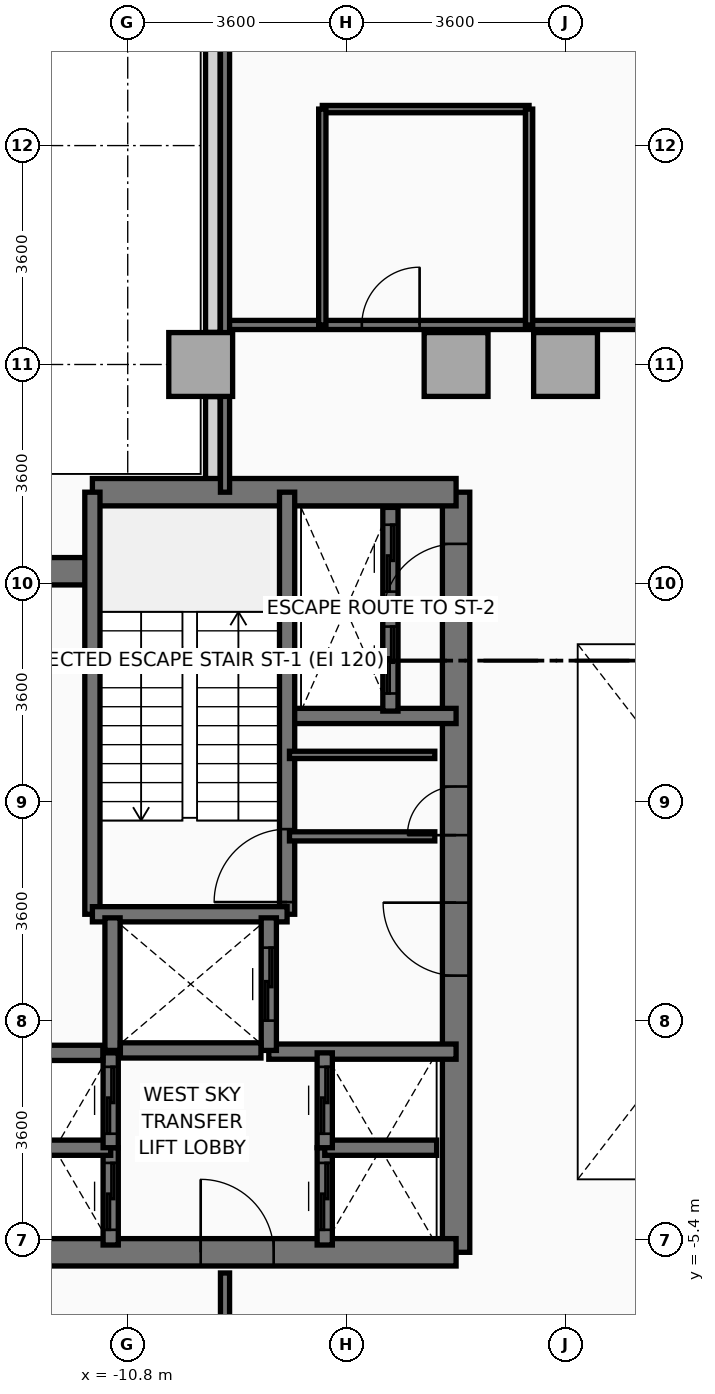
"""IFC4 building model, lengths in metres.
Left out: names, types, materials, properties, quantities, classifications, styles, units other than length and angle.
Written with IfcOpenShell. Run it as: python <this file> out.ifc"""

import sys

from ifc_helpers import new_model, si_unit, direction, frame, frame_2d, origin, origin_2d, place, context, subcontext, project, spatial, rectangle, extrude, source, transform, mapped, element, fill, save


model = new_model("IFC4")
c1 = context("Model", 3, precision=1e-05, world=origin(), true_north=direction((0.0, 1.0)))
c2 = subcontext(c1, "Body", "Model", "MODEL_VIEW")
j1 = project(units=[si_unit("LENGTHUNIT", "METRE"), si_unit("PLANEANGLEUNIT", "RADIAN")], contexts=[c1])
p1 = place(None, origin())
s1 = spatial("IfcSite", under=j1, at=p1, CompositionType="ELEMENT")
p2 = place(p1, origin())
s2 = spatial("IfcBuilding", under=s1, at=p2, CompositionType="ELEMENT")
p3 = place(p2, frame((0.0, 0.0, 93.0)))
s3 = spatial("IfcBuildingStorey", under=s2, at=p3, CompositionType="ELEMENT", Elevation=93.0)
m1 = source(origin(), c2, "Body", "SweptSolid", [
    extrude(rectangle(XDim=1.05, YDim=1.05, at=origin_2d()), origin(), (0.0, 0.0, 1.0), 4.0),
])
for number, where, z_axis, x_axis in (
    (1, (-9.6, 9.0, 0.0), (0.0, 0.0, 1.0), (1.0, 0.0, 0.0)),
    (2, (-5.4, 9.0, 0.0), (0.0, 0.0, 1.0), (1.0, 0.0, 0.0)),
    (3, (-3.6, 9.0, 0.0), (0.0, 0.0, 1.0), (1.0, 0.0, 0.0)),
):
    element("IfcColumn", number, at=place(p3, frame(where, z_axis=z_axis, x_axis=x_axis)), inside=s3, PredefinedType="COLUMN", context=c2, shape_type="MappedRepresentation", body=[
        mapped(m1, transform((0.0, 0.0, 0.0), x_axis=(1.0, 0.0, 0.0), y_axis=(0.0, 1.0, 0.0), z_axis=(0.0, 0.0, 1.0), scale=1.0)),
    ])
p4 = place(p3, frame((-9.4, 6.953, 0.0), z_axis=(0.0, 0.0, 1.0), x_axis=(0.0, 1.0, 0.0)))
e4 = element("IfcWall", 4, at=p4, inside=s3, PredefinedType="PARAPET", context=c2, shape_type="SweptSolid", body=[
    extrude(rectangle(XDim=1.519, YDim=0.24, at=frame_2d((0.76, 0.0))), origin(), (0.0, 0.0, 1.0), 1.15),
])
p5 = place(p3, frame((-9.4, 9.528, 0.0), z_axis=(0.0, 0.0, 1.0), x_axis=(0.0, 1.0, 0.0)))
e5 = element("IfcWall", 5, at=p5, inside=s3, PredefinedType="PARAPET", context=c2, shape_type="SweptSolid", body=[
    extrude(rectangle(XDim=6.075, YDim=0.24, at=frame_2d((3.037, 0.0))), origin(), (0.0, 0.0, 1.0), 1.15),
])
p6 = place(p3, frame((-5.4, -5.6, 0.0), z_axis=(0.0, 0.0, 1.0), x_axis=(0.0, 1.0, 0.0)))
e6 = element("IfcWall", 6, at=p6, inside=s3, PredefinedType="SHEAR", context=c2, shape_type="SweptSolid", body=[
    extrude(rectangle(XDim=12.5, YDim=0.45, at=frame_2d((6.25, 0.0))), origin(), (0.0, 0.0, 1.0), 4.0),
])
p7 = place(p6, frame((4.55, 0.0, 0.0)))
e7 = element("IfcOpeningElement", 7, at=p7, cuts=e6, PredefinedType="OPENING", context=c2, shape_type="SweptSolid", body=[
    extrude(rectangle(XDim=1.2, YDim=2.2, at=frame_2d((0.6, 1.1))), frame((0.0, 0.235, 0.0), z_axis=(0.0, -1.0, 0.0), x_axis=(1.0, 0.0, 0.0)), (0.0, 0.0, 1.0), 0.47),
])
p8 = place(p6, frame((10.45, 0.0, 0.0)))
e8 = element("IfcOpeningElement", 8, at=p8, cuts=e6, PredefinedType="OPENING", context=c2, shape_type="SweptSolid", body=[
    extrude(rectangle(XDim=1.2, YDim=2.2, at=frame_2d((0.6, 1.1))), frame((0.0, 0.235, 0.0), z_axis=(0.0, -1.0, 0.0), x_axis=(1.0, 0.0, 0.0)), (0.0, 0.0, 1.0), 0.47),
])
p9 = place(p6, frame((6.86, 0.0, 0.0)))
e9 = element("IfcOpeningElement", 9, at=p9, cuts=e6, PredefinedType="OPENING", context=c2, shape_type="SweptSolid", body=[
    extrude(rectangle(XDim=0.8, YDim=2.1, at=frame_2d((0.4, 1.05))), frame((0.0, 0.235, 0.0), z_axis=(0.0, -1.0, 0.0), x_axis=(1.0, 0.0, 0.0)), (0.0, 0.0, 1.0), 0.47),
])
p10 = place(p3, frame((-11.381, 6.9, 0.0), z_axis=(0.0, 0.0, 1.0), x_axis=(1.0, 0.0, 0.0)))
e10 = element("IfcWall", 10, at=p10, inside=s3, PredefinedType="SHEAR", context=c2, shape_type="SweptSolid", body=[
    extrude(rectangle(XDim=5.981, YDim=0.45, at=frame_2d((2.991, 0.0))), origin(), (0.0, 0.0, 1.0), 4.0),
])
p11 = place(p3, frame((-13.2, 5.6, 0.0), z_axis=(0.0, 0.0, 1.0), x_axis=(1.0, 0.0, 0.0)))
e11 = element("IfcWall", 11, at=p11, inside=s3, PredefinedType="SHEAR", context=c2, shape_type="SweptSolid", body=[
    extrude(rectangle(XDim=1.819, YDim=0.45, at=frame_2d((0.909, 0.0))), origin(), (0.0, 0.0, 1.0), 4.0),
])
p12 = place(p3, frame((-13.2, -5.6, 0.0), z_axis=(0.0, 0.0, 1.0), x_axis=(1.0, 0.0, 0.0)))
e12 = element("IfcWall", 12, at=p12, inside=s3, PredefinedType="SHEAR", context=c2, shape_type="SweptSolid", body=[
    extrude(rectangle(XDim=7.8, YDim=0.45, at=frame_2d((3.9, 0.0))), origin(), (0.0, 0.0, 1.0), 4.0),
])
p13 = place(p12, frame((3.6, 0.0, 0.0)))
e13 = element("IfcOpeningElement", 13, at=p13, cuts=e12, PredefinedType="OPENING", context=c2, shape_type="SweptSolid", body=[
    extrude(rectangle(XDim=1.2, YDim=2.2, at=frame_2d((0.6, 1.1))), frame((0.0, 0.235, 0.0), z_axis=(0.0, -1.0, 0.0), x_axis=(1.0, 0.0, 0.0)), (0.0, 0.0, 1.0), 0.47),
])
p14 = place(p3, frame((-8.18, 3.22, 0.0), z_axis=(0.0, 0.0, 1.0), x_axis=(1.0, 0.0, 0.0)))
e14 = element("IfcWall", 14, at=p14, inside=s3, PredefinedType="SOLIDWALL", context=c2, shape_type="SweptSolid", body=[
    extrude(rectangle(XDim=2.78, YDim=0.25, at=frame_2d((1.39, 0.0))), origin(), (0.0, 0.0, 1.0), 4.0),
])
p15 = place(p3, frame((-8.48, -2.3, 0.0), z_axis=(0.0, 0.0, 1.0), x_axis=(1.0, 0.0, 0.0)))
e15 = element("IfcWall", 15, at=p15, inside=s3, PredefinedType="SOLIDWALL", context=c2, shape_type="SweptSolid", body=[
    extrude(rectangle(XDim=3.08, YDim=0.25, at=frame_2d((1.54, 0.0))), origin(), (0.0, 0.0, 1.0), 4.0),
])
p16 = place(p3, frame((-8.179, -0.041, 0.0), z_axis=(0.0, 0.0, 1.0), x_axis=(0.0, 1.0, 0.0)))
e16 = element("IfcWall", 16, at=p16, inside=s3, PredefinedType="SOLIDWALL", context=c2, shape_type="SweptSolid", body=[
    extrude(rectangle(XDim=6.941, YDim=0.25, at=frame_2d((3.47, 0.0))), origin(), (0.0, 0.0, 1.0), 4.0),
])
p17 = place(p16, frame((0.2, 0.0, 0.0)))
e17 = element("IfcOpeningElement", 17, at=p17, cuts=e16, PredefinedType="OPENING", context=c2, shape_type="SweptSolid", body=[
    extrude(rectangle(XDim=1.2, YDim=2.2, at=frame_2d((0.6, 1.1))), frame((0.0, 0.135, 0.0), z_axis=(0.0, -1.0, 0.0), x_axis=(1.0, 0.0, 0.0)), (0.0, 0.0, 1.0), 0.27),
])
p18 = place(p3, frame((-11.381, -0.041, 0.0), z_axis=(0.0, 0.0, 1.0), x_axis=(0.0, 1.0, 0.0)))
e18 = element("IfcWall", 18, at=p18, inside=s3, PredefinedType="SOLIDWALL", context=c2, shape_type="SweptSolid", body=[
    extrude(rectangle(XDim=6.941, YDim=0.25, at=frame_2d((3.47, 0.0))), origin(), (0.0, 0.0, 1.0), 4.0),
])
p19 = place(p3, frame((-11.381, -0.041, 0.0), z_axis=(0.0, 0.0, 1.0), x_axis=(1.0, 0.0, 0.0)))
e19 = element("IfcWall", 19, at=p19, inside=s3, PredefinedType="SOLIDWALL", context=c2, shape_type="SweptSolid", body=[
    extrude(rectangle(XDim=3.202, YDim=0.25, at=frame_2d((1.601, 0.0))), origin(), (0.0, 0.0, 1.0), 4.0),
])
p20 = place(p3, frame((-11.05, -2.28, 0.0), z_axis=(0.0, 0.0, 1.0), x_axis=(0.0, 1.0, 0.0)))
e20 = element("IfcWall", 20, at=p20, inside=s3, PredefinedType="SOLIDWALL", context=c2, shape_type="SweptSolid", body=[
    extrude(rectangle(XDim=2.18, YDim=0.25, at=frame_2d((1.09, 0.0))), origin(), (0.0, 0.0, 1.0), 4.0),
])
p21 = place(p3, frame((-8.48, -2.28, 0.0), z_axis=(0.0, 0.0, 1.0), x_axis=(0.0, 1.0, 0.0)))
e21 = element("IfcWall", 21, at=p21, inside=s3, PredefinedType="SOLIDWALL", context=c2, shape_type="SweptSolid", body=[
    extrude(rectangle(XDim=2.18, YDim=0.25, at=frame_2d((1.09, 0.0))), origin(), (0.0, 0.0, 1.0), 4.0),
])
p22 = place(p21, frame((0.49, 0.0, 0.0)))
e22 = element("IfcOpeningElement", 22, at=p22, cuts=e21, PredefinedType="OPENING", context=c2, shape_type="SweptSolid", body=[
    extrude(rectangle(XDim=1.2, YDim=2.2, at=frame_2d((0.6, 1.1))), frame((0.0, 0.135, 0.0), z_axis=(0.0, -1.0, 0.0), x_axis=(1.0, 0.0, 0.0)), (0.0, 0.0, 1.0), 0.27),
])
p23 = place(p3, frame((-10.921, -2.28, 0.0), z_axis=(0.0, 0.0, 1.0), x_axis=(1.0, 0.0, 0.0)))
e23 = element("IfcWall", 23, at=p23, inside=s3, PredefinedType="SOLIDWALL", context=c2, shape_type="SweptSolid", body=[
    extrude(rectangle(XDim=2.312, YDim=0.25, at=frame_2d((1.156, 0.0))), origin(), (0.0, 0.0, 1.0), 4.0),
])
p24 = place(p3, frame((-11.08, -5.48, 0.0), z_axis=(0.0, 0.0, 1.0), x_axis=(0.0, 1.0, 0.0)))
e24 = element("IfcWall", 24, at=p24, inside=s3, PredefinedType="SOLIDWALL", context=c2, shape_type="SweptSolid", body=[
    extrude(rectangle(XDim=1.6, YDim=0.25, at=frame_2d((0.8, 0.0))), origin(), (0.0, 0.0, 1.0), 4.0),
])
p25 = place(p24, frame((0.25, 0.0, 0.0)))
e25 = element("IfcOpeningElement", 25, at=p25, cuts=e24, PredefinedType="OPENING", context=c2, shape_type="SweptSolid", body=[
    extrude(rectangle(XDim=1.1, YDim=2.2, at=frame_2d((0.55, 1.1))), frame((0.0, 0.135, 0.0), z_axis=(0.0, -1.0, 0.0), x_axis=(1.0, 0.0, 0.0)), (0.0, 0.0, 1.0), 0.27),
])
p26 = place(p3, frame((-12.92, -3.88, 0.0), z_axis=(0.0, 0.0, 1.0), x_axis=(1.0, 0.0, 0.0)))
e26 = element("IfcWall", 26, at=p26, inside=s3, PredefinedType="SOLIDWALL", context=c2, shape_type="SweptSolid", body=[
    extrude(rectangle(XDim=1.84, YDim=0.25, at=frame_2d((0.92, 0.0))), origin(), (0.0, 0.0, 1.0), 4.0),
])
p27 = place(p3, frame((-11.08, -3.88, 0.0), z_axis=(0.0, 0.0, 1.0), x_axis=(0.0, 1.0, 0.0)))
e27 = element("IfcWall", 27, at=p27, inside=s3, PredefinedType="SOLIDWALL", context=c2, shape_type="SweptSolid", body=[
    extrude(rectangle(XDim=1.56, YDim=0.25, at=frame_2d((0.78, 0.0))), origin(), (0.0, 0.0, 1.0), 4.0),
])
p28 = place(p27, frame((0.23, 0.0, 0.0)))
e28 = element("IfcOpeningElement", 28, at=p28, cuts=e27, PredefinedType="OPENING", context=c2, shape_type="SweptSolid", body=[
    extrude(rectangle(XDim=1.1, YDim=2.2, at=frame_2d((0.55, 1.1))), frame((0.0, 0.135, 0.0), z_axis=(0.0, -1.0, 0.0), x_axis=(1.0, 0.0, 0.0)), (0.0, 0.0, 1.0), 0.27),
])
p29 = place(p3, frame((-12.791, -2.32, 0.0), z_axis=(0.0, 0.0, 1.0), x_axis=(1.0, 0.0, 0.0)))
e29 = element("IfcWall", 29, at=p29, inside=s3, PredefinedType="SOLIDWALL", context=c2, shape_type="SweptSolid", body=[
    extrude(rectangle(XDim=1.582, YDim=0.25, at=frame_2d((0.791, 0.0))), origin(), (0.0, 0.0, 1.0), 4.0),
])
p30 = place(p3, frame((-7.56, -5.48, 0.0), z_axis=(0.0, 0.0, 1.0), x_axis=(0.0, 1.0, 0.0)))
e30 = element("IfcWall", 30, at=p30, inside=s3, PredefinedType="SOLIDWALL", context=c2, shape_type="SweptSolid", body=[
    extrude(rectangle(XDim=1.6, YDim=0.25, at=frame_2d((0.8, 0.0))), origin(), (0.0, 0.0, 1.0), 4.0),
])
p31 = place(p30, frame((0.25, 0.0, 0.0)))
e31 = element("IfcOpeningElement", 31, at=p31, cuts=e30, PredefinedType="OPENING", context=c2, shape_type="SweptSolid", body=[
    extrude(rectangle(XDim=1.1, YDim=2.2, at=frame_2d((0.55, 1.1))), frame((0.0, 0.135, 0.0), z_axis=(0.0, -1.0, 0.0), x_axis=(1.0, 0.0, 0.0)), (0.0, 0.0, 1.0), 0.27),
])
p32 = place(p3, frame((-7.56, -3.88, 0.0), z_axis=(0.0, 0.0, 1.0), x_axis=(1.0, 0.0, 0.0)))
e32 = element("IfcWall", 32, at=p32, inside=s3, PredefinedType="SOLIDWALL", context=c2, shape_type="SweptSolid", body=[
    extrude(rectangle(XDim=1.84, YDim=0.25, at=frame_2d((0.92, 0.0))), origin(), (0.0, 0.0, 1.0), 4.0),
])
p33 = place(p3, frame((-7.56, -3.88, 0.0), z_axis=(0.0, 0.0, 1.0), x_axis=(0.0, 1.0, 0.0)))
e33 = element("IfcWall", 33, at=p33, inside=s3, PredefinedType="SOLIDWALL", context=c2, shape_type="SweptSolid", body=[
    extrude(rectangle(XDim=1.56, YDim=0.25, at=frame_2d((0.78, 0.0))), origin(), (0.0, 0.0, 1.0), 4.0),
])
p34 = place(p33, frame((0.23, 0.0, 0.0)))
e34 = element("IfcOpeningElement", 34, at=p34, cuts=e33, PredefinedType="OPENING", context=c2, shape_type="SweptSolid", body=[
    extrude(rectangle(XDim=1.1, YDim=2.2, at=frame_2d((0.55, 1.1))), frame((0.0, 0.135, 0.0), z_axis=(0.0, -1.0, 0.0), x_axis=(1.0, 0.0, 0.0)), (0.0, 0.0, 1.0), 0.27),
])
p35 = place(p3, frame((-6.48, 3.3, 0.0), z_axis=(0.0, 0.0, 1.0), x_axis=(0.0, 1.0, 0.0)))
e35 = element("IfcWall", 35, at=p35, inside=s3, PredefinedType="SOLIDWALL", context=c2, shape_type="SweptSolid", body=[
    extrude(rectangle(XDim=1.68, YDim=0.25, at=frame_2d((0.84, 0.0))), origin(), (0.0, 0.0, 1.0), 4.0),
])
p36 = place(p35, frame((0.29, 0.0, 0.0)))
e36 = element("IfcOpeningElement", 36, at=p36, cuts=e35, PredefinedType="OPENING", context=c2, shape_type="SweptSolid", body=[
    extrude(rectangle(XDim=1.1, YDim=2.2, at=frame_2d((0.55, 1.1))), frame((0.0, 0.135, 0.0), z_axis=(0.0, -1.0, 0.0), x_axis=(1.0, 0.0, 0.0)), (0.0, 0.0, 1.0), 0.27),
])
p37 = place(p3, frame((-7.95, 4.98, 0.0), z_axis=(0.0, 0.0, 1.0), x_axis=(1.0, 0.0, 0.0)))
e37 = element("IfcWall", 37, at=p37, inside=s3, PredefinedType="SOLIDWALL", context=c2, shape_type="SweptSolid", body=[
    extrude(rectangle(XDim=1.47, YDim=0.25, at=frame_2d((0.735, 0.0))), origin(), (0.0, 0.0, 1.0), 4.0),
])
p38 = place(p3, frame((-6.48, 4.98, 0.0), z_axis=(0.0, 0.0, 1.0), x_axis=(0.0, 1.0, 0.0)))
e38 = element("IfcWall", 38, at=p38, inside=s3, PredefinedType="SOLIDWALL", context=c2, shape_type="SweptSolid", body=[
    extrude(rectangle(XDim=1.67, YDim=0.25, at=frame_2d((0.835, 0.0))), origin(), (0.0, 0.0, 1.0), 4.0),
])
p39 = place(p38, frame((0.285, 0.0, 0.0)))
e39 = element("IfcOpeningElement", 39, at=p39, cuts=e38, PredefinedType="OPENING", context=c2, shape_type="SweptSolid", body=[
    extrude(rectangle(XDim=1.1, YDim=2.2, at=frame_2d((0.55, 1.1))), frame((0.0, 0.135, 0.0), z_axis=(0.0, -1.0, 0.0), x_axis=(1.0, 0.0, 0.0)), (0.0, 0.0, 1.0), 0.27),
])
p40 = place(p3, frame((-8.14, 1.24, 0.0), z_axis=(0.0, 0.0, 1.0), x_axis=(1.0, 0.0, 0.0)))
e40 = element("IfcWall", 40, at=p40, inside=s3, PredefinedType="PARTITIONING", context=c2, shape_type="SweptSolid", body=[
    extrude(rectangle(XDim=2.39, YDim=0.15, at=frame_2d((1.195, 0.0))), origin(), (0.0, 0.0, 1.0), 3.1),
])
p41 = place(p3, frame((-8.14, 2.58, 0.0), z_axis=(0.0, 0.0, 1.0), x_axis=(1.0, 0.0, 0.0)))
e41 = element("IfcWall", 41, at=p41, inside=s3, PredefinedType="PARTITIONING", context=c2, shape_type="SweptSolid", body=[
    extrude(rectangle(XDim=2.39, YDim=0.12, at=frame_2d((1.195, 0.0))), origin(), (0.0, 0.0, 1.0), 3.1),
])
p42 = place(p3, frame((-9.2, 9.65, 0.0), z_axis=(0.0, 0.0, 1.0), x_axis=(1.0, 0.0, 0.0)))
e42 = element("IfcWall", 42, at=p42, inside=s3, PredefinedType="PARTITIONING", context=c2, shape_type="SweptSolid", body=[
    extrude(rectangle(XDim=18.4, YDim=0.15, at=frame_2d((9.2, 0.0))), origin(), (0.0, 0.0, 1.0), 4.0),
])
p43 = place(p42, frame((2.25, 0.0, 0.0)))
e43 = element("IfcOpeningElement", 43, at=p43, cuts=e42, PredefinedType="OPENING", context=c2, shape_type="SweptSolid", body=[
    extrude(rectangle(XDim=0.95, YDim=2.15, at=frame_2d((0.475, 1.075))), frame((0.0, 0.085, 0.0), z_axis=(0.0, -1.0, 0.0), x_axis=(1.0, 0.0, 0.0)), (0.0, 0.0, 1.0), 0.17),
])
p44 = place(p42, frame((15.55, 0.0, 0.0)))
e44 = element("IfcOpeningElement", 44, at=p44, cuts=e42, PredefinedType="OPENING", context=c2, shape_type="SweptSolid", body=[
    extrude(rectangle(XDim=1.1, YDim=2.2, at=frame_2d((0.55, 1.1))), frame((0.0, 0.085, 0.0), z_axis=(0.0, -1.0, 0.0), x_axis=(1.0, 0.0, 0.0)), (0.0, 0.0, 1.0), 0.17),
])
p45 = place(p3, frame((-9.2, 6.9, 0.0), z_axis=(0.0, 0.0, 1.0), x_axis=(0.0, 1.0, 0.0)))
e45 = element("IfcWall", 45, at=p45, inside=s3, PredefinedType="PARTITIONING", context=c2, shape_type="SweptSolid", body=[
    extrude(rectangle(XDim=8.78, YDim=0.15, at=frame_2d((4.39, 0.0))), origin(), (0.0, 0.0, 1.0), 3.5),
])
p46 = place(p3, frame((-7.6, 13.2, 0.0), z_axis=(0.0, 0.0, 1.0), x_axis=(1.0, 0.0, 0.0)))
e46 = element("IfcWall", 46, at=p46, inside=s3, PredefinedType="PARTITIONING", context=c2, shape_type="SweptSolid", body=[
    extrude(rectangle(XDim=3.4, YDim=0.12, at=frame_2d((1.7, 0.0))), origin(), (0.0, 0.0, 1.0), 4.0),
])
for number, where, z_axis, x_axis in (
    (47, (-7.6, 9.65, 0.0), (0.0, 0.0, 1.0), (0.0, 1.0, 0.0)),
    (48, (-4.2, 9.65, 0.0), (0.0, 0.0, 1.0), (0.0, 1.0, 0.0)),
):
    element("IfcWall", number, at=place(p3, frame(where, z_axis=z_axis, x_axis=x_axis)), inside=s3, PredefinedType="PARTITIONING", context=c2, shape_type="SweptSolid", body=[
        extrude(rectangle(XDim=3.55, YDim=0.12, at=frame_2d((1.775, 0.0))), origin(), (0.0, 0.0, 1.0), 4.0),
    ])
p47 = place(p3, frame((-9.2, -15.68, 0.0), z_axis=(0.0, 0.0, 1.0), x_axis=(0.0, 1.0, 0.0)))
e49 = element("IfcWall", 49, at=p47, inside=s3, PredefinedType="PARTITIONING", context=c2, shape_type="SweptSolid", body=[
    extrude(rectangle(XDim=9.74, YDim=0.15, at=frame_2d((4.87, 0.0))), origin(), (0.0, 0.0, 1.0), 3.5),
])
m2 = source(origin(), c2, "Body", "SweptSolid", [
    extrude(rectangle(XDim=1.2, YDim=2.2, at=frame_2d((0.6, 1.1))), frame((0.0, 0.025, 0.0), z_axis=(0.0, -1.0, 0.0), x_axis=(1.0, 0.0, 0.0)), (0.0, 0.0, 1.0), 0.05),
])
p48 = place(p17, origin())
e50 = element("IfcDoor", 50, at=p48, inside=s3, OperationType="SINGLE_SWING_LEFT", PredefinedType="DOOR", context=c2, shape_type="MappedRepresentation", body=[
    mapped(m2, transform((0.0, 0.0, 0.0), x_axis=(1.0, 0.0, 0.0), y_axis=(0.0, 1.0, 0.0), z_axis=(0.0, 0.0, 1.0), scale=1.0)),
])
fill(e17, e50)
p49 = place(p7, origin())
e51 = element("IfcDoor", 51, at=p49, inside=s3, OperationType="SINGLE_SWING_RIGHT", PredefinedType="DOOR", context=c2, shape_type="MappedRepresentation", body=[
    mapped(m2, transform((0.0, 0.0, 0.0), x_axis=(1.0, 0.0, 0.0), y_axis=(0.0, 1.0, 0.0), z_axis=(0.0, 0.0, 1.0), scale=1.0)),
])
fill(e7, e51)
p50 = place(p8, origin())
e52 = element("IfcDoor", 52, at=p50, inside=s3, OperationType="SINGLE_SWING_LEFT", PredefinedType="DOOR", context=c2, shape_type="MappedRepresentation", body=[
    mapped(m2, transform((0.0, 0.0, 0.0), x_axis=(1.0, 0.0, 0.0), y_axis=(0.0, 1.0, 0.0), z_axis=(0.0, 0.0, 1.0), scale=1.0)),
])
fill(e8, e52)
p51 = place(p13, origin())
e53 = element("IfcDoor", 53, at=p51, inside=s3, OperationType="SINGLE_SWING_LEFT", PredefinedType="DOOR", context=c2, shape_type="MappedRepresentation", body=[
    mapped(m2, transform((0.0, 0.0, 0.0), x_axis=(1.0, 0.0, 0.0), y_axis=(0.0, 1.0, 0.0), z_axis=(0.0, 0.0, 1.0), scale=1.0)),
])
fill(e13, e53)
m3 = source(origin(), c2, "Body", "SweptSolid", [
    extrude(rectangle(XDim=0.8, YDim=2.1, at=frame_2d((0.4, 1.05))), frame((0.0, 0.025, 0.0), z_axis=(0.0, -1.0, 0.0), x_axis=(1.0, 0.0, 0.0)), (0.0, 0.0, 1.0), 0.05),
])
p52 = place(p9, origin())
e54 = element("IfcDoor", 54, at=p52, inside=s3, OperationType="SINGLE_SWING_LEFT", PredefinedType="DOOR", context=c2, shape_type="MappedRepresentation", body=[
    mapped(m3, transform((0.0, 0.0, 0.0), x_axis=(1.0, 0.0, 0.0), y_axis=(0.0, 1.0, 0.0), z_axis=(0.0, 0.0, 1.0), scale=1.0)),
])
fill(e9, e54)
p53 = place(p22, origin())
e55 = element("IfcDoor", 55, at=p53, inside=s3, OperationType="SLIDING_TO_RIGHT", PredefinedType="DOOR", context=c2, shape_type="MappedRepresentation", body=[
    mapped(m2, transform((0.0, 0.0, 0.0), x_axis=(1.0, 0.0, 0.0), y_axis=(0.0, 1.0, 0.0), z_axis=(0.0, 0.0, 1.0), scale=1.0)),
])
fill(e22, e55)
m4 = source(origin(), c2, "Body", "SweptSolid", [
    extrude(rectangle(XDim=1.1, YDim=2.2, at=frame_2d((0.55, 1.1))), frame((0.0, 0.025, 0.0), z_axis=(0.0, -1.0, 0.0), x_axis=(1.0, 0.0, 0.0)), (0.0, 0.0, 1.0), 0.05),
])
p54 = place(p25, origin())
e56 = element("IfcDoor", 56, at=p54, inside=s3, OperationType="SLIDING_TO_LEFT", PredefinedType="DOOR", context=c2, shape_type="MappedRepresentation", body=[
    mapped(m4, transform((0.0, 0.0, 0.0), x_axis=(1.0, 0.0, 0.0), y_axis=(0.0, 1.0, 0.0), z_axis=(0.0, 0.0, 1.0), scale=1.0)),
])
fill(e25, e56)
p55 = place(p28, origin())
e57 = element("IfcDoor", 57, at=p55, inside=s3, OperationType="SLIDING_TO_LEFT", PredefinedType="DOOR", context=c2, shape_type="MappedRepresentation", body=[
    mapped(m4, transform((0.0, 0.0, 0.0), x_axis=(1.0, 0.0, 0.0), y_axis=(0.0, 1.0, 0.0), z_axis=(0.0, 0.0, 1.0), scale=1.0)),
])
fill(e28, e57)
p56 = place(p31, origin())
e58 = element("IfcDoor", 58, at=p56, inside=s3, OperationType="SLIDING_TO_LEFT", PredefinedType="DOOR", context=c2, shape_type="MappedRepresentation", body=[
    mapped(m4, transform((0.0, 0.0, 0.0), x_axis=(1.0, 0.0, 0.0), y_axis=(0.0, 1.0, 0.0), z_axis=(0.0, 0.0, 1.0), scale=1.0)),
])
fill(e31, e58)
p57 = place(p34, origin())
e59 = element("IfcDoor", 59, at=p57, inside=s3, OperationType="SLIDING_TO_LEFT", PredefinedType="DOOR", context=c2, shape_type="MappedRepresentation", body=[
    mapped(m4, transform((0.0, 0.0, 0.0), x_axis=(1.0, 0.0, 0.0), y_axis=(0.0, 1.0, 0.0), z_axis=(0.0, 0.0, 1.0), scale=1.0)),
])
fill(e34, e59)
p58 = place(p36, origin())
e60 = element("IfcDoor", 60, at=p58, inside=s3, OperationType="SLIDING_TO_LEFT", PredefinedType="DOOR", context=c2, shape_type="MappedRepresentation", body=[
    mapped(m4, transform((0.0, 0.0, 0.0), x_axis=(1.0, 0.0, 0.0), y_axis=(0.0, 1.0, 0.0), z_axis=(0.0, 0.0, 1.0), scale=1.0)),
])
fill(e36, e60)
p59 = place(p39, origin())
e61 = element("IfcDoor", 61, at=p59, inside=s3, OperationType="SLIDING_TO_LEFT", PredefinedType="DOOR", context=c2, shape_type="MappedRepresentation", body=[
    mapped(m4, transform((0.0, 0.0, 0.0), x_axis=(1.0, 0.0, 0.0), y_axis=(0.0, 1.0, 0.0), z_axis=(0.0, 0.0, 1.0), scale=1.0)),
])
fill(e39, e61)
m5 = source(origin(), c2, "Body", "SweptSolid", [
    extrude(rectangle(XDim=0.95, YDim=2.15, at=frame_2d((0.475, 1.075))), frame((0.0, 0.025, 0.0), z_axis=(0.0, -1.0, 0.0), x_axis=(1.0, 0.0, 0.0)), (0.0, 0.0, 1.0), 0.05),
])
p60 = place(p43, origin())
e62 = element("IfcDoor", 62, at=p60, inside=s3, OperationType="SINGLE_SWING_RIGHT", PredefinedType="DOOR", context=c2, shape_type="MappedRepresentation", body=[
    mapped(m5, transform((0.0, 0.0, 0.0), x_axis=(1.0, 0.0, 0.0), y_axis=(0.0, 1.0, 0.0), z_axis=(0.0, 0.0, 1.0), scale=1.0)),
])
fill(e43, e62)
save(model, sys.argv[1])
